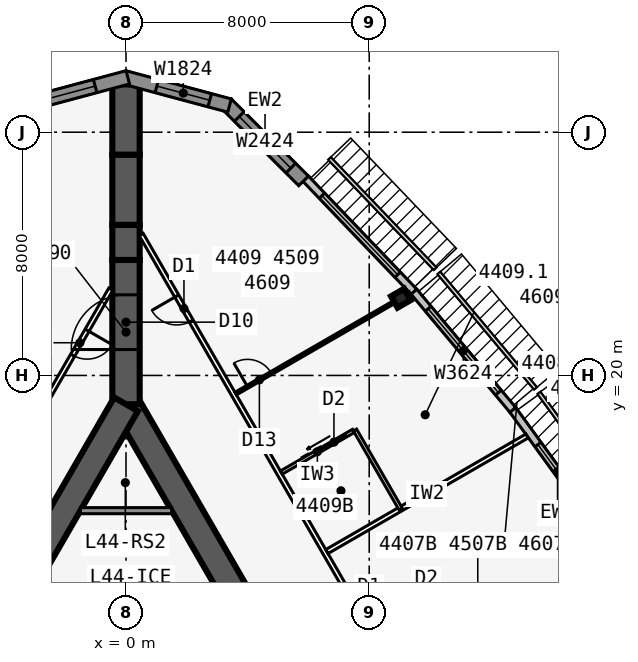
"""IFC4 building model, lengths in metres.
Left out: names, types, materials, properties, quantities, classifications, styles, units other than length and angle.
Written with IfcOpenShell. Run it as: python <this file> out.ifc"""

import sys

from ifc_helpers import new_model, si_unit, direction, frame, frame_2d, origin, origin_2d, place, context, subcontext, project, spatial, polyline, rectangle, i_section, outline, extrude, element, fill, save


model = new_model("IFC4")
c1 = context("Model", 3, precision=1e-05, world=origin(), true_north=direction((0.0, 1.0)))
c2 = subcontext(c1, "Body", "Model", "MODEL_VIEW")
j1 = project(units=[si_unit("LENGTHUNIT", "METRE"), si_unit("PLANEANGLEUNIT", "RADIAN")], contexts=[c1])
p1 = place(None, origin())
s1 = spatial("IfcSite", under=j1, at=p1, CompositionType="ELEMENT")
p2 = place(p1, origin())
s2 = spatial("IfcBuilding", under=s1, at=p2, CompositionType="ELEMENT")
p3 = place(p2, frame((0.0, 0.0, 165.7)))
s3 = spatial("IfcBuildingStorey", under=s2, at=p3, CompositionType="ELEMENT", Elevation=165.7)
p4 = place(p3, frame((16.5, -9.526, 0.0), z_axis=(0.0, 0.0, 1.0), x_axis=(-0.499999749417, 0.866025548458, 0.0)))
e1 = element("IfcWall", 1, at=p4, inside=s3, PredefinedType="SHEAR", context=c2, shape_type="SweptSolid", body=[
    extrude(rectangle(XDim=33.0, YDim=0.9, at=frame_2d((16.5, 0.0))), origin(), (0.0, 0.0, 1.0), 3.4),
])
p5 = place(p4, frame((14.15, 0.0, 0.0)))
e2 = element("IfcOpeningElement", 2, at=p5, cuts=e1, PredefinedType="OPENING", context=c2, shape_type="SweptSolid", body=[
    extrude(rectangle(XDim=1.8, YDim=2.13, at=frame_2d((0.9, 1.065))), frame((0.0, 0.46, 0.0), z_axis=(0.0, -1.0, 0.0), x_axis=(1.0, 0.0, 0.0)), (0.0, 0.0, 1.0), 0.92),
])
p6 = place(p4, frame((12.6, 0.0, 0.0)))
e3 = element("IfcOpeningElement", 3, at=p6, cuts=e1, PredefinedType="OPENING", context=c2, shape_type="SweptSolid", body=[
    extrude(rectangle(XDim=1.0, YDim=2.13, at=frame_2d((0.5, 1.065))), frame((0.0, 0.46, 0.0), z_axis=(0.0, -1.0, 0.0), x_axis=(1.0, 0.0, 0.0)), (0.0, 0.0, 1.0), 0.92),
])
p7 = place(p3, frame((0.0, 19.052, 0.0), z_axis=(0.0, 0.0, 1.0), x_axis=(-0.499999749417, -0.866025548458, 0.0)))
e4 = element("IfcWall", 4, at=p7, inside=s3, PredefinedType="SHEAR", context=c2, shape_type="SweptSolid", body=[
    extrude(rectangle(XDim=33.0, YDim=0.9, at=frame_2d((16.5, 0.0))), origin(), (0.0, 0.0, 1.0), 3.4),
])
p8 = place(p7, frame((14.15, 0.0, 0.0)))
e5 = element("IfcOpeningElement", 5, at=p8, cuts=e4, PredefinedType="OPENING", context=c2, shape_type="SweptSolid", body=[
    extrude(rectangle(XDim=1.8, YDim=2.13, at=frame_2d((0.9, 1.065))), frame((0.0, 0.46, 0.0), z_axis=(0.0, -1.0, 0.0), x_axis=(1.0, 0.0, 0.0)), (0.0, 0.0, 1.0), 0.92),
])
p9 = place(p7, frame((12.6, 0.0, 0.0)))
e6 = element("IfcOpeningElement", 6, at=p9, cuts=e4, PredefinedType="OPENING", context=c2, shape_type="SweptSolid", body=[
    extrude(rectangle(XDim=1.0, YDim=2.13, at=frame_2d((0.5, 1.065))), frame((0.0, 0.46, 0.0), z_axis=(0.0, -1.0, 0.0), x_axis=(1.0, 0.0, 0.0)), (0.0, 0.0, 1.0), 0.92),
])
p10 = place(p3, frame((0.0, 19.052, 0.0), z_axis=(0.0, 0.0, 1.0), x_axis=(0.0, 1.0, 0.0)))
e7 = element("IfcWall", 7, at=p10, inside=s3, PredefinedType="SHEAR", context=c2, shape_type="SweptSolid", body=[
    extrude(rectangle(XDim=4.746, YDim=0.9, at=frame_2d((2.373, 0.0))), origin(), (0.0, 0.0, 1.0), 3.4),
])
p11 = place(p10, frame((1.8, 0.0, 0.0)))
e8 = element("IfcOpeningElement", 8, at=p11, cuts=e7, PredefinedType="OPENING", context=c2, shape_type="SweptSolid", body=[
    extrude(rectangle(XDim=1.8, YDim=2.13, at=frame_2d((0.9, 1.065))), frame((0.0, 0.46, 0.0), z_axis=(0.0, -1.0, 0.0), x_axis=(1.0, 0.0, 0.0)), (0.0, 0.0, 1.0), 0.92),
])
p12 = place(p3, frame((0.0, 23.799, 0.0), z_axis=(0.0, 0.0, 1.0), x_axis=(0.0, 1.0, 0.0)))
e9 = element("IfcWall", 9, at=p12, inside=s3, PredefinedType="SHEAR", context=c2, shape_type="SweptSolid", body=[
    extrude(rectangle(XDim=1.155, YDim=0.9, at=frame_2d((0.577, 0.0))), origin(), (0.0, 0.0, 1.0), 3.4),
])
p13 = place(p3, frame((0.0, 24.953, 0.0), z_axis=(0.0, 0.0, 1.0), x_axis=(0.0, 1.0, 0.0)))
e10 = element("IfcWall", 10, at=p13, inside=s3, PredefinedType="SHEAR", context=c2, shape_type="SweptSolid", body=[
    extrude(rectangle(XDim=2.309, YDim=0.9, at=frame_2d((1.155, 0.0))), origin(), (0.0, 0.0, 1.0), 3.4),
])
p14 = place(p3, frame((0.0, 27.263, 0.0), z_axis=(0.0, 0.0, 1.0), x_axis=(0.0, 1.0, 0.0)))
e11 = element("IfcWall", 11, at=p14, inside=s3, PredefinedType="SHEAR", context=c2, shape_type="SweptSolid", body=[
    extrude(rectangle(XDim=2.31, YDim=0.9, at=frame_2d((1.155, 0.0))), origin(), (0.0, 0.0, 1.0), 3.4),
])
p15 = place(p3, frame((9.041, 22.541, 0.0), z_axis=(0.0, 0.0, 1.0), x_axis=(-0.5, 0.866025403784, 0.0)))
e12 = element("IfcColumn", 12, at=p15, inside=s3, PredefinedType="COLUMN", context=c2, shape_type="SweptSolid", body=[
    extrude(i_section(OverallWidth=0.432, OverallDepth=0.498, WebThickness=0.056, FlangeThickness=0.089, at=origin_2d()), origin(), (0.0, 0.0, 1.0), 3.4),
])
p16 = place(p3, frame((15.672, 14.807, 0.0), z_axis=(0.0, 0.0, 1.0), x_axis=(-0.587669188412, 0.809101307001, 0.0)))
e13 = element("IfcWall", 13, at=p16, inside=s3, PredefinedType="STANDARD", context=c2, shape_type="SweptSolid", body=[
    extrude(rectangle(XDim=5.028, YDim=0.25, at=frame_2d((2.514, 0.0))), origin(), (0.0, 0.0, 1.0), 3.235),
])
p17 = place(p16, frame((0.61, 0.0, 0.45)))
e14 = element("IfcOpeningElement", 14, at=p17, cuts=e13, PredefinedType="OPENING", context=c2, shape_type="SweptSolid", body=[
    extrude(rectangle(XDim=3.0, YDim=2.4, at=frame_2d((1.5, 1.2))), frame((0.0, 0.135, 0.0), z_axis=(0.0, -1.0, 0.0), x_axis=(1.0, 0.0, 0.0)), (0.0, 0.0, 1.0), 0.27),
])
p18 = place(p3, frame((12.723, 18.868, 0.0), z_axis=(0.0, 0.0, 1.0), x_axis=(-0.641810386606, 0.766863369607, 0.0)))
e15 = element("IfcWall", 15, at=p18, inside=s3, PredefinedType="STANDARD", context=c2, shape_type="SweptSolid", body=[
    extrude(rectangle(XDim=5.076, YDim=0.25, at=frame_2d((2.538, 0.0))), origin(), (0.0, 0.0, 1.0), 3.235),
])
p19 = place(p18, frame((0.738, 0.0, 0.45)))
e16 = element("IfcOpeningElement", 16, at=p19, cuts=e15, PredefinedType="OPENING", context=c2, shape_type="SweptSolid", body=[
    extrude(rectangle(XDim=3.6, YDim=2.4, at=frame_2d((1.8, 1.2))), frame((0.0, 0.135, 0.0), z_axis=(0.0, -1.0, 0.0), x_axis=(1.0, 0.0, 0.0)), (0.0, 0.0, 1.0), 0.27),
])
p20 = place(p3, frame((9.471, 22.754, 0.0), z_axis=(0.0, 0.0, 1.0), x_axis=(-0.691719937936, 0.722165858693, 0.0)))
e17 = element("IfcWall", 17, at=p20, inside=s3, PredefinedType="STANDARD", context=c2, shape_type="SweptSolid", body=[
    extrude(rectangle(XDim=5.148, YDim=0.25, at=frame_2d((2.574, 0.0))), origin(), (0.0, 0.0, 1.0), 3.235),
])
p21 = place(p20, frame((0.774, 0.0, 0.45)))
e18 = element("IfcOpeningElement", 18, at=p21, cuts=e17, PredefinedType="OPENING", context=c2, shape_type="SweptSolid", body=[
    extrude(rectangle(XDim=3.6, YDim=2.4, at=frame_2d((1.8, 1.2))), frame((0.0, 0.135, 0.0), z_axis=(0.0, -1.0, 0.0), x_axis=(1.0, 0.0, 0.0)), (0.0, 0.0, 1.0), 0.27),
])
p22 = place(p3, frame((5.841, 26.399, 0.0), z_axis=(0.0, 0.0, 1.0), x_axis=(-0.707106781187, 0.707106781187, 0.0)))
e19 = element("IfcWall", 19, at=p22, inside=s3, PredefinedType="SOLIDWALL", context=c2, shape_type="SweptSolid", body=[
    extrude(rectangle(XDim=3.586, YDim=0.45, at=frame_2d((1.793, 0.0))), origin(), (0.0, 0.0, 1.0), 3.235),
])
p23 = place(p22, frame((0.593, 0.0, 0.45)))
e20 = element("IfcOpeningElement", 20, at=p23, cuts=e19, PredefinedType="OPENING", context=c2, shape_type="SweptSolid", body=[
    extrude(rectangle(XDim=2.4, YDim=2.4, at=frame_2d((1.2, 1.2))), frame((0.0, 0.235, 0.0), z_axis=(0.0, -1.0, 0.0), x_axis=(1.0, 0.0, 0.0)), (0.0, 0.0, 1.0), 0.47),
])
p24 = place(p3, frame((3.406, 28.877, 0.0), z_axis=(0.0, 0.0, 1.0), x_axis=(-0.965924653531, 0.258823421857, 0.0)))
e21 = element("IfcWall", 21, at=p24, inside=s3, PredefinedType="SOLIDWALL", context=c2, shape_type="SweptSolid", body=[
    extrude(outline(polyline([(3.586, 0.225), (3.527, 0.225), (3.035, 0.093), (3.0, 0.225), (0.0, 0.225), (0.0, -0.225), (3.586, -0.225), (3.586, 0.225)])), origin(), (0.0, 0.0, 1.0), 3.235),
])
p25 = place(p24, frame((0.675, 0.0, 0.45)))
e22 = element("IfcOpeningElement", 22, at=p25, cuts=e21, PredefinedType="OPENING", context=c2, shape_type="SweptSolid", body=[
    extrude(rectangle(XDim=1.8, YDim=2.4, at=frame_2d((0.9, 1.2))), frame((0.0, 0.235, 0.0), z_axis=(0.0, -1.0, 0.0), x_axis=(1.0, 0.0, 0.0)), (0.0, 0.0, 1.0), 0.47),
])
p26 = place(p3, frame((0.058, 29.805, 0.0), z_axis=(0.0, 0.0, 1.0), x_axis=(-0.965924653531, -0.258823421857, 0.0)))
e23 = element("IfcWall", 23, at=p26, inside=s3, PredefinedType="SOLIDWALL", context=c2, shape_type="SweptSolid", body=[
    extrude(outline(polyline([(3.586, 0.225), (0.586, 0.225), (0.551, 0.093), (0.06, 0.225), (0.0, 0.225), (0.0, -0.225), (3.586, -0.225), (3.586, 0.225)])), origin(), (0.0, 0.0, 1.0), 3.235),
])
p27 = place(p26, frame((1.111, 0.0, 0.45)))
e24 = element("IfcOpeningElement", 24, at=p27, cuts=e23, PredefinedType="OPENING", context=c2, shape_type="SweptSolid", body=[
    extrude(rectangle(XDim=1.8, YDim=2.4, at=frame_2d((0.9, 1.2))), frame((0.0, 0.235, 0.0), z_axis=(0.0, -1.0, 0.0), x_axis=(1.0, 0.0, 0.0)), (0.0, 0.0, 1.0), 0.47),
])
p28 = place(p3, frame((21.586, -11.885, 0.0), z_axis=(0.0, 0.0, 1.0), x_axis=(-0.500001915564, 0.86602429783, 0.0)))
e25 = element("IfcWall", 25, at=p28, inside=s3, PredefinedType="PARTITIONING", context=c2, shape_type="SweptSolid", body=[
    extrude(rectangle(XDim=42.172, YDim=0.15, at=frame_2d((21.086, 0.0))), origin(), (0.0, 0.0, 1.0), 3.235),
])
p29 = place(p28, frame((1.911, 0.0, 0.0)))
e26 = element("IfcOpeningElement", 26, at=p29, cuts=e25, PredefinedType="OPENING", context=c2, shape_type="SweptSolid", body=[
    extrude(rectangle(XDim=0.95, YDim=2.13, at=frame_2d((0.475, 1.065))), frame((0.0, 0.085, 0.0), z_axis=(0.0, -1.0, 0.0), x_axis=(1.0, 0.0, 0.0)), (0.0, 0.0, 1.0), 0.17),
])
p30 = place(p28, frame((9.311, 0.0, 0.0)))
e27 = element("IfcOpeningElement", 27, at=p30, cuts=e25, PredefinedType="OPENING", context=c2, shape_type="SweptSolid", body=[
    extrude(rectangle(XDim=0.95, YDim=2.13, at=frame_2d((0.475, 1.065))), frame((0.0, 0.085, 0.0), z_axis=(0.0, -1.0, 0.0), x_axis=(1.0, 0.0, 0.0)), (0.0, 0.0, 1.0), 0.17),
])
p31 = place(p28, frame((14.611, 0.0, 0.0)))
e28 = element("IfcOpeningElement", 28, at=p31, cuts=e25, PredefinedType="OPENING", context=c2, shape_type="SweptSolid", body=[
    extrude(rectangle(XDim=0.95, YDim=2.13, at=frame_2d((0.475, 1.065))), frame((0.0, 0.085, 0.0), z_axis=(0.0, -1.0, 0.0), x_axis=(1.0, 0.0, 0.0)), (0.0, 0.0, 1.0), 0.17),
])
p32 = place(p28, frame((26.711, 0.0, 0.0)))
e29 = element("IfcOpeningElement", 29, at=p32, cuts=e25, PredefinedType="OPENING", context=c2, shape_type="SweptSolid", body=[
    extrude(rectangle(XDim=0.95, YDim=2.13, at=frame_2d((0.475, 1.065))), frame((0.0, 0.085, 0.0), z_axis=(0.0, -1.0, 0.0), x_axis=(1.0, 0.0, 0.0)), (0.0, 0.0, 1.0), 0.17),
])
p33 = place(p28, frame((38.884, 0.0, 0.0)))
e30 = element("IfcOpeningElement", 30, at=p33, cuts=e25, PredefinedType="OPENING", context=c2, shape_type="SweptSolid", body=[
    extrude(rectangle(XDim=0.95, YDim=2.13, at=frame_2d((0.475, 1.065))), frame((0.0, 0.085, 0.0), z_axis=(0.0, -1.0, 0.0), x_axis=(1.0, 0.0, 0.0)), (0.0, 0.0, 1.0), 0.17),
])
p34 = place(p3, frame((6.608, 14.208, 0.0), z_axis=(0.0, 0.0, 1.0), x_axis=(0.866025154315, 0.500000432093, 0.0)))
e31 = element("IfcWall", 31, at=p34, inside=s3, PredefinedType="PARTITIONING", context=c2, shape_type="SweptSolid", body=[
    extrude(rectangle(XDim=7.603, YDim=0.15, at=frame_2d((3.801, 0.0))), origin(), (0.0, 0.0, 1.0), 3.235),
])
p35 = place(p3, frame((3.608, 19.404, 0.0), z_axis=(0.0, 0.0, 1.0), x_axis=(0.866015989873, 0.500016305018, 0.0)))
e32 = element("IfcWall", 32, at=p35, inside=s3, PredefinedType="PARTITIONING", context=c2, shape_type="SweptSolid", body=[
    extrude(rectangle(XDim=6.616, YDim=0.1, at=frame_2d((3.308, 0.0))), origin(), (0.0, 0.0, 1.0), 2.389),
])
p36 = place(p35, frame((0.45, 0.0, 0.0)))
e33 = element("IfcOpeningElement", 33, at=p36, cuts=e32, PredefinedType="OPENING", context=c2, shape_type="SweptSolid", body=[
    extrude(rectangle(XDim=0.9, YDim=2.13, at=frame_2d((0.45, 1.065))), frame((0.0, 0.06, 0.0), z_axis=(0.0, -1.0, 0.0), x_axis=(1.0, 0.0, 0.0)), (0.0, 0.0, 1.0), 0.12),
])
p37 = place(p3, frame((9.033, 15.607, 0.0), z_axis=(0.0, 0.0, 1.0), x_axis=(-0.50002537861, 0.866010750942, 0.0)))
e34 = element("IfcWall", 34, at=p37, inside=s3, PredefinedType="PLUMBINGWALL", context=c2, shape_type="SweptSolid", body=[
    extrude(rectangle(XDim=3.0, YDim=0.12, at=frame_2d((1.5, 0.0))), origin(), (0.0, 0.0, 1.0), 3.235),
])
p38 = place(p3, frame((5.108, 16.805, 0.0), z_axis=(0.0, 0.0, 1.0), x_axis=(0.866035715982, 0.499982138324, 0.0)))
e35 = element("IfcWall", 35, at=p38, inside=s3, PredefinedType="PLUMBINGWALL", context=c2, shape_type="SweptSolid", body=[
    extrude(rectangle(XDim=2.74, YDim=0.12, at=frame_2d((1.37, 0.0))), origin(), (0.0, 0.0, 1.0), 3.235),
])
p39 = place(p38, frame((1.55, 0.0, 0.0)))
e36 = element("IfcOpeningElement", 36, at=p39, cuts=e35, PredefinedType="OPENING", context=c2, shape_type="SweptSolid", body=[
    extrude(rectangle(XDim=0.9, YDim=2.13, at=frame_2d((0.45, 1.065))), frame((0.0, 0.07, 0.0), z_axis=(0.0, -1.0, 0.0), x_axis=(1.0, 0.0, 0.0)), (0.0, 0.0, 1.0), 0.14),
])
p40 = place(p3, frame((-0.5, 22.836, 0.0), z_axis=(0.0, 0.0, 1.0), x_axis=(-0.500001677587, -0.866024435227, 0.0)))
e37 = element("IfcWall", 37, at=p40, inside=s3, PredefinedType="PARTITIONING", context=c2, shape_type="SweptSolid", body=[
    extrude(rectangle(XDim=39.054, YDim=0.15, at=frame_2d((19.527, 0.0))), origin(), (0.0, 0.0, 1.0), 3.235),
])
p41 = place(p40, frame((1.558, 0.0, 0.0)))
e38 = element("IfcOpeningElement", 38, at=p41, cuts=e37, PredefinedType="OPENING", context=c2, shape_type="SweptSolid", body=[
    extrude(rectangle(XDim=0.95, YDim=2.13, at=frame_2d((0.475, 1.065))), frame((0.0, 0.085, 0.0), z_axis=(0.0, -1.0, 0.0), x_axis=(1.0, 0.0, 0.0)), (0.0, 0.0, 1.0), 0.17),
])
p42 = place(p40, frame((19.052, 0.0, 0.0)))
e39 = element("IfcOpeningElement", 39, at=p42, cuts=e37, PredefinedType="OPENING", context=c2, shape_type="SweptSolid", body=[
    extrude(rectangle(XDim=0.95, YDim=2.13, at=frame_2d((0.475, 1.065))), frame((0.0, 0.085, 0.0), z_axis=(0.0, -1.0, 0.0), x_axis=(1.0, 0.0, 0.0)), (0.0, 0.0, 1.0), 0.17),
])
p43 = place(p40, frame((31.752, 0.0, 0.0)))
e40 = element("IfcOpeningElement", 40, at=p43, cuts=e37, PredefinedType="OPENING", context=c2, shape_type="SweptSolid", body=[
    extrude(rectangle(XDim=0.95, YDim=2.13, at=frame_2d((0.475, 1.065))), frame((0.0, 0.085, 0.0), z_axis=(0.0, -1.0, 0.0), x_axis=(1.0, 0.0, 0.0)), (0.0, 0.0, 1.0), 0.17),
])
p44 = place(p40, frame((37.752, 0.0, 0.0)))
e41 = element("IfcOpeningElement", 41, at=p44, cuts=e37, PredefinedType="OPENING", context=c2, shape_type="SweptSolid", body=[
    extrude(rectangle(XDim=0.95, YDim=2.13, at=frame_2d((0.475, 1.065))), frame((0.0, 0.085, 0.0), z_axis=(0.0, -1.0, 0.0), x_axis=(1.0, 0.0, 0.0)), (0.0, 0.0, 1.0), 0.17),
])
p45 = place(p3, frame((-1.501, 15.552, 0.0), z_axis=(0.0, 0.0, 1.0), x_axis=(1.0, 0.0, 0.0)))
e42 = element("IfcWall", 42, at=p45, inside=s3, PredefinedType="SOLIDWALL", context=c2, shape_type="SweptSolid", body=[
    extrude(rectangle(XDim=3.002, YDim=0.2, at=frame_2d((1.501, 0.0))), origin(), (0.0, 0.0, 1.0), 3.235),
])
p46 = place(p17, origin())
e43 = element("IfcWindow", 43, at=p46, inside=s3, PartitioningType="SINGLE_PANEL", PredefinedType="WINDOW", context=c2, shape_type="SweptSolid", body=[
    extrude(rectangle(XDim=3.0, YDim=2.4, at=frame_2d((1.5, 1.2))), frame((0.0, 0.03, 0.0), z_axis=(0.0, -1.0, 0.0), x_axis=(1.0, 0.0, 0.0)), (0.0, 0.0, 1.0), 0.06),
])
fill(e14, e43)
p47 = place(p19, origin())
e44 = element("IfcWindow", 44, at=p47, inside=s3, PartitioningType="SINGLE_PANEL", PredefinedType="WINDOW", context=c2, shape_type="SweptSolid", body=[
    extrude(rectangle(XDim=3.6, YDim=2.4, at=frame_2d((1.8, 1.2))), frame((0.0, 0.03, 0.0), z_axis=(0.0, -1.0, 0.0), x_axis=(1.0, 0.0, 0.0)), (0.0, 0.0, 1.0), 0.06),
])
fill(e16, e44)
p48 = place(p21, origin())
e45 = element("IfcWindow", 45, at=p48, inside=s3, PartitioningType="SINGLE_PANEL", PredefinedType="WINDOW", context=c2, shape_type="SweptSolid", body=[
    extrude(rectangle(XDim=3.6, YDim=2.4, at=frame_2d((1.8, 1.2))), frame((0.0, 0.03, 0.0), z_axis=(0.0, -1.0, 0.0), x_axis=(1.0, 0.0, 0.0)), (0.0, 0.0, 1.0), 0.06),
])
fill(e18, e45)
p49 = place(p23, origin())
e46 = element("IfcWindow", 46, at=p49, inside=s3, PartitioningType="SINGLE_PANEL", PredefinedType="WINDOW", context=c2, shape_type="SweptSolid", body=[
    extrude(rectangle(XDim=2.4, YDim=2.4, at=frame_2d((1.2, 1.2))), frame((0.0, 0.03, 0.0), z_axis=(0.0, -1.0, 0.0), x_axis=(1.0, 0.0, 0.0)), (0.0, 0.0, 1.0), 0.06),
])
fill(e20, e46)
p50 = place(p25, origin())
e47 = element("IfcWindow", 47, at=p50, inside=s3, PartitioningType="SINGLE_PANEL", PredefinedType="WINDOW", context=c2, shape_type="SweptSolid", body=[
    extrude(rectangle(XDim=1.8, YDim=2.4, at=frame_2d((0.9, 1.2))), frame((0.0, 0.03, 0.0), z_axis=(0.0, -1.0, 0.0), x_axis=(1.0, 0.0, 0.0)), (0.0, 0.0, 1.0), 0.06),
])
fill(e22, e47)
p51 = place(p27, origin())
e48 = element("IfcWindow", 48, at=p51, inside=s3, PartitioningType="SINGLE_PANEL", PredefinedType="WINDOW", context=c2, shape_type="SweptSolid", body=[
    extrude(rectangle(XDim=1.8, YDim=2.4, at=frame_2d((0.9, 1.2))), frame((0.0, 0.03, 0.0), z_axis=(0.0, -1.0, 0.0), x_axis=(1.0, 0.0, 0.0)), (0.0, 0.0, 1.0), 0.06),
])
fill(e24, e48)
p52 = place(p36, origin())
e49 = element("IfcDoor", 49, at=p52, inside=s3, OperationType="SINGLE_SWING_LEFT", PredefinedType="DOOR", context=c2, shape_type="SweptSolid", body=[
    extrude(rectangle(XDim=0.9, YDim=2.13, at=frame_2d((0.45, 1.065))), frame((0.0, 0.025, 0.0), z_axis=(0.0, -1.0, 0.0), x_axis=(1.0, 0.0, 0.0)), (0.0, 0.0, 1.0), 0.05),
])
fill(e33, e49)
p53 = place(p39, origin())
e50 = element("IfcDoor", 50, at=p53, inside=s3, OperationType="SLIDING_TO_LEFT", PredefinedType="DOOR", context=c2, shape_type="SweptSolid", body=[
    extrude(rectangle(XDim=0.9, YDim=2.13, at=frame_2d((0.45, 1.065))), frame((0.0, 0.025, 0.0), z_axis=(0.0, -1.0, 0.0), x_axis=(1.0, 0.0, 0.0)), (0.0, 0.0, 1.0), 0.05),
])
fill(e36, e50)
p54 = place(p33, origin())
e51 = element("IfcDoor", 51, at=p54, inside=s3, OperationType="SINGLE_SWING_RIGHT", PredefinedType="DOOR", context=c2, shape_type="SweptSolid", body=[
    extrude(rectangle(XDim=0.95, YDim=2.13, at=frame_2d((0.475, 1.065))), frame((0.0, 0.025, 0.0), z_axis=(0.0, -1.0, 0.0), x_axis=(1.0, 0.0, 0.0)), (0.0, 0.0, 1.0), 0.05),
])
fill(e30, e51)
p55 = place(p41, origin())
e52 = element("IfcDoor", 52, at=p55, inside=s3, OperationType="SINGLE_SWING_LEFT", PredefinedType="DOOR", context=c2, shape_type="SweptSolid", body=[
    extrude(rectangle(XDim=0.95, YDim=2.13, at=frame_2d((0.475, 1.065))), frame((0.0, 0.025, 0.0), z_axis=(0.0, -1.0, 0.0), x_axis=(1.0, 0.0, 0.0)), (0.0, 0.0, 1.0), 0.05),
])
fill(e38, e52)
p56 = place(p11, origin())
e53 = element("IfcDoor", 53, at=p56, inside=s3, OperationType="DOUBLE_DOOR_DOUBLE_SWING", PredefinedType="DOOR", context=c2, shape_type="SweptSolid", body=[
    extrude(rectangle(XDim=1.8, YDim=2.13, at=frame_2d((0.9, 1.065))), frame((0.0, 0.025, 0.0), z_axis=(0.0, -1.0, 0.0), x_axis=(1.0, 0.0, 0.0)), (0.0, 0.0, 1.0), 0.05),
])
fill(e8, e53)
save(model, sys.argv[1])
